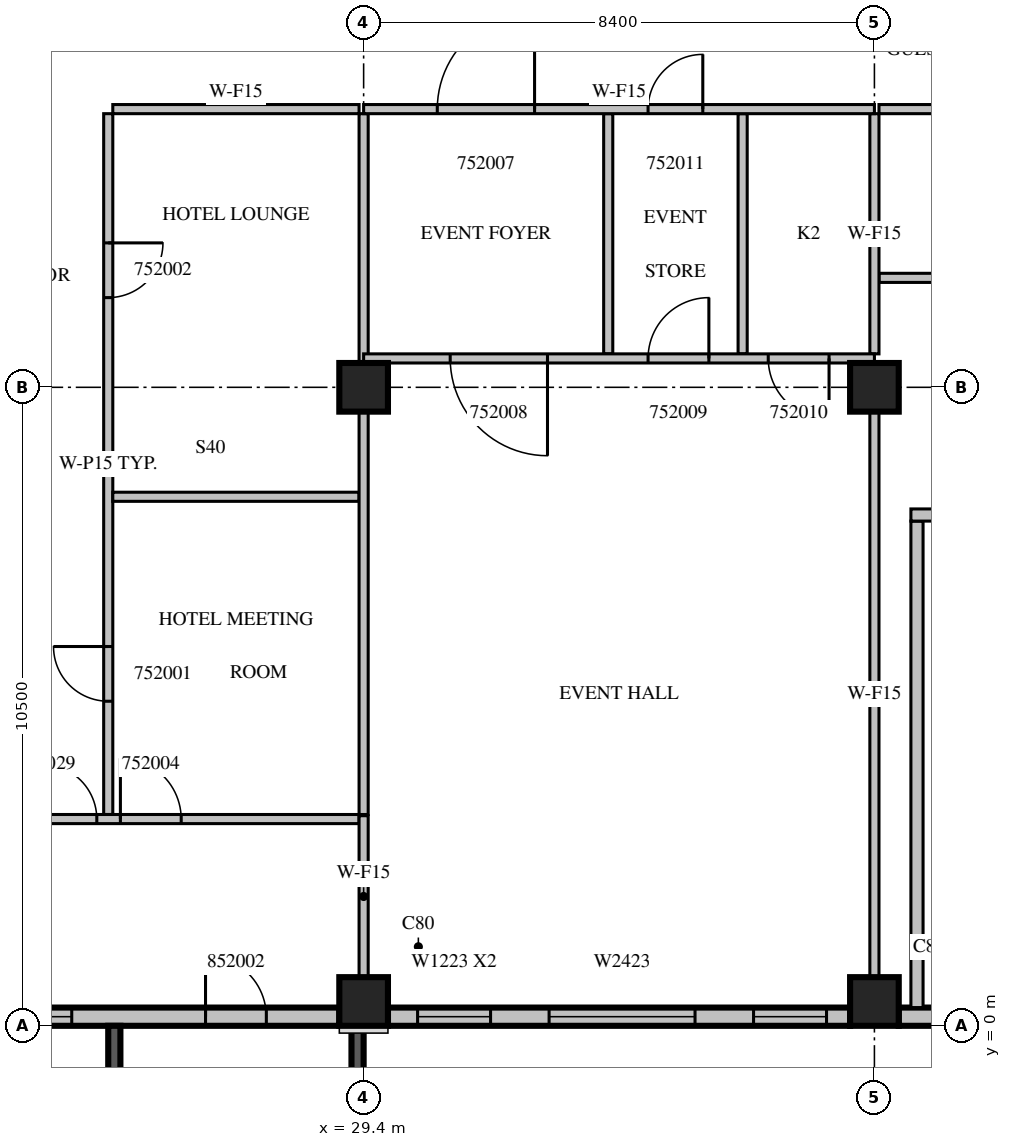
"""IFC4 building model, lengths in metres.
Left out: names, types, materials, properties, quantities, classifications, styles, units other than length and angle.
Written with IfcOpenShell. Run it as: python <this file> out.ifc"""

import sys

from ifc_helpers import new_model, si_unit, direction, frame, frame_2d, origin, origin_2d, place, context, subcontext, project, spatial, rectangle, extrude, source, transform, mapped, element, fill, save


model = new_model("IFC4")
c1 = context("Model", 3, precision=1e-05, world=origin(), true_north=direction((0.0, 1.0)))
c2 = subcontext(c1, "Body", "Model", "MODEL_VIEW")
j1 = project(units=[si_unit("LENGTHUNIT", "METRE"), si_unit("PLANEANGLEUNIT", "RADIAN")], contexts=[c1])
p1 = place(None, origin())
s1 = spatial("IfcSite", under=j1, at=p1, CompositionType="ELEMENT")
p2 = place(p1, origin())
s2 = spatial("IfcBuilding", under=s1, at=p2, CompositionType="ELEMENT")
p3 = place(p2, frame((0.0, 0.0, 231.0)))
s3 = spatial("IfcBuildingStorey", under=s2, at=p3, CompositionType="ELEMENT", Elevation=231.0)
m1 = source(origin(), c2, "Body", "SweptSolid", [
    extrude(rectangle(XDim=0.8, YDim=0.8, at=origin_2d()), origin(), (0.0, 0.0, 1.0), 3.8),
])
for number, where, z_axis, x_axis in (
    (1, (29.4, 0.4, 0.0), (0.0, 0.0, 1.0), (1.0, 0.0, 0.0)),
    (2, (37.8, 0.4, 0.0), (0.0, 0.0, 1.0), (1.0, 0.0, 0.0)),
    (3, (29.4, 10.5, 0.0), (0.0, 0.0, 1.0), (1.0, 0.0, 0.0)),
    (4, (37.8, 10.5, 0.0), (0.0, 0.0, 1.0), (1.0, 0.0, 0.0)),
):
    element("IfcColumn", number, at=place(p3, frame(where, z_axis=z_axis, x_axis=x_axis)), inside=s3, PredefinedType="COLUMN", context=c2, shape_type="MappedRepresentation", body=[
        mapped(m1, transform((0.0, 0.0, 0.0), scale=1.0)),
    ])
m2 = source(origin(), c2, "Body", "SweptSolid", [
    extrude(rectangle(XDim=7.6, YDim=0.3, at=frame_2d((3.8, 0.0))), origin(), (0.0, 0.0, 1.0), 3.4),
])
p4 = place(p3, frame((21.4, 0.15, 0.0), z_axis=(0.0, 0.0, 1.0), x_axis=(1.0, 0.0, 0.0)))
e5 = element("IfcWall", 5, at=p4, inside=s3, PredefinedType="STANDARD", context=c2, shape_type="MappedRepresentation", body=[
    mapped(m2, transform((0.0, 0.0, 0.0), scale=1.0)),
])
m3 = source(origin(), c2, "Body", "SweptSolid", [
    extrude(rectangle(XDim=3.0, YDim=2.3, at=frame_2d((1.5, 1.15))), frame((0.0, 0.16, 0.0), z_axis=(0.0, -1.0, 0.0), x_axis=(1.0, 0.0, 0.0)), (0.0, 0.0, 1.0), 0.32),
])
p5 = place(p4, frame((0.2, 0.0, 0.6)))
e6 = element("IfcOpeningElement", 6, at=p5, cuts=e5, PredefinedType="OPENING", context=c2, shape_type="MappedRepresentation", body=[
    mapped(m3, transform((0.0, 0.0, 0.0), scale=1.0)),
])
m4 = source(origin(), c2, "Body", "SweptSolid", [
    extrude(rectangle(XDim=1.0, YDim=2.1, at=frame_2d((0.5, 1.05))), frame((0.0, 0.16, 0.0), z_axis=(0.0, -1.0, 0.0), x_axis=(1.0, 0.0, 0.0)), (0.0, 0.0, 1.0), 0.32),
])
p6 = place(p4, frame((5.4, 0.0, 0.0)))
e7 = element("IfcOpeningElement", 7, at=p6, cuts=e5, PredefinedType="OPENING", context=c2, shape_type="MappedRepresentation", body=[
    mapped(m4, transform((0.0, 0.0, 0.0), scale=1.0)),
])
p7 = place(p3, frame((29.8, 0.15, 0.0), z_axis=(0.0, 0.0, 1.0), x_axis=(1.0, 0.0, 0.0)))
e8 = element("IfcWall", 8, at=p7, inside=s3, PredefinedType="STANDARD", context=c2, shape_type="MappedRepresentation", body=[
    mapped(m2, transform((0.0, 0.0, 0.0), scale=1.0)),
])
m5 = source(origin(), c2, "Body", "SweptSolid", [
    extrude(rectangle(XDim=1.2, YDim=2.3, at=frame_2d((0.6, 1.15))), frame((0.0, 0.16, 0.0), z_axis=(0.0, -1.0, 0.0), x_axis=(1.0, 0.0, 0.0)), (0.0, 0.0, 1.0), 0.32),
])
p8 = place(p7, frame((0.487, 0.0, 0.6)))
e9 = element("IfcOpeningElement", 9, at=p8, cuts=e8, PredefinedType="OPENING", context=c2, shape_type="MappedRepresentation", body=[
    mapped(m5, transform((0.0, 0.0, 0.0), scale=1.0)),
])
p9 = place(p7, frame((6.013, 0.0, 0.6)))
e10 = element("IfcOpeningElement", 10, at=p9, cuts=e8, PredefinedType="OPENING", context=c2, shape_type="MappedRepresentation", body=[
    mapped(m5, transform((0.0, 0.0, 0.0), scale=1.0)),
])
m6 = source(origin(), c2, "Body", "SweptSolid", [
    extrude(rectangle(XDim=2.4, YDim=2.3, at=frame_2d((1.2, 1.15))), frame((0.0, 0.16, 0.0), z_axis=(0.0, -1.0, 0.0), x_axis=(1.0, 0.0, 0.0)), (0.0, 0.0, 1.0), 0.32),
])
p10 = place(p7, frame((2.65, 0.0, 0.6)))
e11 = element("IfcOpeningElement", 11, at=p10, cuts=e8, PredefinedType="OPENING", context=c2, shape_type="MappedRepresentation", body=[
    mapped(m6, transform((0.0, 0.0, 0.0), scale=1.0)),
])
m7 = source(origin(), c2, "Body", "SweptSolid", [
    extrude(rectangle(XDim=2.0, YDim=0.3, at=frame_2d((1.0, 0.0))), origin(), (0.0, 0.0, 1.0), 3.4),
])
p11 = place(p3, frame((38.2, 0.15, 0.0), z_axis=(0.0, 0.0, 1.0), x_axis=(1.0, 0.0, 0.0)))
e12 = element("IfcWall", 12, at=p11, inside=s3, PredefinedType="STANDARD", context=c2, shape_type="MappedRepresentation", body=[
    mapped(m7, transform((0.0, 0.0, 0.0), scale=1.0)),
])
m8 = source(origin(), c2, "Body", "SweptSolid", [
    extrude(rectangle(XDim=3.9, YDim=0.2, at=frame_2d((1.95, 0.0))), origin(), (0.0, 0.0, 1.0), 3.39),
])
p12 = place(p3, frame((25.3, 0.0, 0.0), z_axis=(0.0, 0.0, 1.0), x_axis=(0.0, -1.0, 0.0)))
e13 = element("IfcWall", 13, at=p12, inside=s3, PredefinedType="SOLIDWALL", context=c2, shape_type="MappedRepresentation", body=[
    mapped(m8, transform((0.0, 0.0, 0.0), scale=1.0)),
])
m9 = source(origin(), c2, "Body", "SweptSolid", [
    extrude(rectangle(XDim=2.4, YDim=2.3, at=frame_2d((1.2, 1.15))), frame((0.0, 0.11, 0.0), z_axis=(0.0, -1.0, 0.0), x_axis=(1.0, 0.0, 0.0)), (0.0, 0.0, 1.0), 0.22),
])
p13 = place(p12, frame((0.75, 0.0, 0.6)))
e14 = element("IfcOpeningElement", 14, at=p13, cuts=e13, PredefinedType="OPENING", context=c2, shape_type="MappedRepresentation", body=[
    mapped(m9, transform((0.0, 0.0, 0.0), scale=1.0)),
])
p14 = place(p3, frame((29.3, 0.0, 0.0), z_axis=(0.0, 0.0, 1.0), x_axis=(0.0, -1.0, 0.0)))
e15 = element("IfcWall", 15, at=p14, inside=s3, PredefinedType="SOLIDWALL", context=c2, shape_type="MappedRepresentation", body=[
    mapped(m8, transform((0.0, 0.0, 0.0), scale=1.0)),
])
p15 = place(p14, frame((0.75, 0.0, 0.6)))
e16 = element("IfcOpeningElement", 16, at=p15, cuts=e15, PredefinedType="OPENING", context=c2, shape_type="MappedRepresentation", body=[
    mapped(m9, transform((0.0, 0.0, 0.0), scale=1.0)),
])
m10 = source(origin(), c2, "Body", "SweptSolid", [
    extrude(rectangle(XDim=8.0, YDim=0.2, at=frame_2d((4.0, 0.0))), origin(), (0.0, 0.0, 1.0), 3.4),
])
p16 = place(p3, frame((38.5, 0.3, 0.0), z_axis=(0.0, 0.0, 1.0), x_axis=(0.0, 1.0, 0.0)))
e17 = element("IfcWall", 17, at=p16, inside=s3, PredefinedType="PARTITIONING", context=c2, shape_type="MappedRepresentation", body=[
    mapped(m10, transform((0.0, 0.0, 0.0), scale=1.0)),
])
m11 = source(origin(), c2, "Body", "SweptSolid", [
    extrude(rectangle(XDim=5.45, YDim=0.2, at=frame_2d((2.725, 0.0))), origin(), (0.0, 0.0, 1.0), 3.4),
])
p17 = place(p3, frame((38.4, 8.4, 0.0), z_axis=(0.0, 0.0, 1.0), x_axis=(1.0, 0.0, 0.0)))
e18 = element("IfcWall", 18, at=p17, inside=s3, PredefinedType="PARTITIONING", context=c2, shape_type="MappedRepresentation", body=[
    mapped(m11, transform((0.0, 0.0, 0.0), scale=1.0)),
])
m12 = source(origin(), c2, "Body", "SweptSolid", [
    extrude(rectangle(XDim=1.2, YDim=2.1, at=frame_2d((0.6, 1.05))), frame((0.0, 0.11, 0.0), z_axis=(0.0, -1.0, 0.0), x_axis=(1.0, 0.0, 0.0)), (0.0, 0.0, 1.0), 0.22),
])
p18 = place(p17, frame((0.4, 0.0, 0.0)))
e19 = element("IfcOpeningElement", 19, at=p18, cuts=e18, PredefinedType="OPENING", context=c2, shape_type="MappedRepresentation", body=[
    mapped(m12, transform((0.0, 0.0, 0.0), scale=1.0)),
])
m13 = source(origin(), c2, "Body", "SweptSolid", [
    extrude(rectangle(XDim=0.9, YDim=2.1, at=frame_2d((0.45, 1.05))), frame((0.0, 0.11, 0.0), z_axis=(0.0, -1.0, 0.0), x_axis=(1.0, 0.0, 0.0)), (0.0, 0.0, 1.0), 0.22),
])
p19 = place(p17, frame((3.25, 0.0, 0.0)))
e20 = element("IfcOpeningElement", 20, at=p19, cuts=e18, PredefinedType="OPENING", context=c2, shape_type="MappedRepresentation", body=[
    mapped(m13, transform((0.0, 0.0, 0.0), scale=1.0)),
])
m14 = source(origin(), c2, "Body", "SweptSolid", [
    extrude(rectangle(XDim=11.525, YDim=0.15, at=frame_2d((5.763, 0.0))), origin(), (0.0, 0.0, 1.0), 3.4),
])
p20 = place(p3, frame((25.2, 15.0, 0.0), z_axis=(0.0, 0.0, 1.0), x_axis=(0.0, -1.0, 0.0)))
e21 = element("IfcWall", 21, at=p20, inside=s3, PredefinedType="PARTITIONING", context=c2, shape_type="MappedRepresentation", body=[
    mapped(m14, transform((0.0, 0.0, 0.0), scale=1.0)),
])
m15 = source(origin(), c2, "Body", "SweptSolid", [
    extrude(rectangle(XDim=0.9, YDim=2.1, at=frame_2d((0.45, 1.05))), frame((0.0, 0.085, 0.0), z_axis=(0.0, -1.0, 0.0), x_axis=(1.0, 0.0, 0.0)), (0.0, 0.0, 1.0), 0.17),
])
p21 = place(p20, frame((8.762, 0.0, 0.0)))
e22 = element("IfcOpeningElement", 22, at=p21, cuts=e21, PredefinedType="OPENING", context=c2, shape_type="MappedRepresentation", body=[
    mapped(m15, transform((0.0, 0.0, 0.0), scale=1.0)),
])
p22 = place(p20, frame((2.125, 0.0, 0.0)))
e23 = element("IfcOpeningElement", 23, at=p22, cuts=e21, PredefinedType="OPENING", context=c2, shape_type="MappedRepresentation", body=[
    mapped(m15, transform((0.0, 0.0, 0.0), scale=1.0)),
])
m16 = source(origin(), c2, "Body", "SweptSolid", [
    extrude(rectangle(XDim=4.05, YDim=0.15, at=frame_2d((2.025, 0.0))), origin(), (0.0, 0.0, 1.0), 3.4),
])
for number, where, z_axis, x_axis in (
    (24, (29.325, 8.7, 0.0), (0.0, 0.0, 1.0), (-1.0, 0.0, 0.0)),
    (25, (29.325, 15.075, 0.0), (0.0, 0.0, 1.0), (-1.0, 0.0, 0.0)),
):
    element("IfcWall", number, at=place(p3, frame(where, z_axis=z_axis, x_axis=x_axis)), inside=s3, PredefinedType="PARTITIONING", context=c2, shape_type="MappedRepresentation", body=[
        mapped(m16, transform((0.0, 0.0, 0.0), scale=1.0)),
    ])
m17 = source(origin(), c2, "Body", "SweptSolid", [
    extrude(rectangle(XDim=6.626, YDim=0.15, at=frame_2d((3.313, 0.0))), origin(), (0.0, 0.0, 1.0), 3.4),
])
p23 = place(p3, frame((29.4, 3.475, 0.0), z_axis=(0.0, 0.0, 1.0), x_axis=(0.0, 1.0, 0.0)))
e26 = element("IfcWall", 26, at=p23, inside=s3, PredefinedType="PARTITIONING", context=c2, shape_type="MappedRepresentation", body=[
    mapped(m17, transform((0.0, 0.0, 0.0), scale=1.0)),
])
m18 = source(origin(), c2, "Body", "SweptSolid", [
    extrude(rectangle(XDim=4.101, YDim=0.15, at=frame_2d((2.05, 0.0))), origin(), (0.0, 0.0, 1.0), 3.4),
])
p24 = place(p3, frame((29.4, 10.899, 0.0), z_axis=(0.0, 0.0, 1.0), x_axis=(0.0, 1.0, 0.0)))
e27 = element("IfcWall", 27, at=p24, inside=s3, PredefinedType="PARTITIONING", context=c2, shape_type="MappedRepresentation", body=[
    mapped(m18, transform((0.0, 0.0, 0.0), scale=1.0)),
])
m19 = source(origin(), c2, "Body", "SweptSolid", [
    extrude(rectangle(XDim=7.525, YDim=0.15, at=frame_2d((3.763, 0.0))), origin(), (0.0, 0.0, 1.0), 3.4),
])
p25 = place(p3, frame((21.8, 3.4, 0.0), z_axis=(0.0, 0.0, 1.0), x_axis=(1.0, 0.0, 0.0)))
e28 = element("IfcWall", 28, at=p25, inside=s3, PredefinedType="PARTITIONING", context=c2, shape_type="MappedRepresentation", body=[
    mapped(m19, transform((0.0, 0.0, 0.0), scale=1.0)),
])
m20 = source(origin(), c2, "Body", "SweptSolid", [
    extrude(rectangle(XDim=1.0, YDim=2.1, at=frame_2d((0.5, 1.05))), frame((0.0, 0.085, 0.0), z_axis=(0.0, -1.0, 0.0), x_axis=(1.0, 0.0, 0.0)), (0.0, 0.0, 1.0), 0.17),
])
p26 = place(p25, frame((3.6, 0.0, 0.0)))
e29 = element("IfcOpeningElement", 29, at=p26, cuts=e28, PredefinedType="OPENING", context=c2, shape_type="MappedRepresentation", body=[
    mapped(m20, transform((0.0, 0.0, 0.0), scale=1.0)),
])
p27 = place(p25, frame((2.312, 0.0, 0.0)))
e30 = element("IfcOpeningElement", 30, at=p27, cuts=e28, PredefinedType="OPENING", context=c2, shape_type="MappedRepresentation", body=[
    mapped(m15, transform((0.0, 0.0, 0.0), scale=1.0)),
])
m21 = source(origin(), c2, "Body", "SweptSolid", [
    extrude(rectangle(XDim=6.45, YDim=0.15, at=frame_2d((3.225, 0.0))), origin(), (0.0, 0.0, 1.0), 3.4),
])
p28 = place(p3, frame((37.875, 12.3, 0.0), z_axis=(0.0, 0.0, 1.0), x_axis=(1.0, 0.0, 0.0)))
e31 = element("IfcWall", 31, at=p28, inside=s3, PredefinedType="PARTITIONING", context=c2, shape_type="MappedRepresentation", body=[
    mapped(m21, transform((0.0, 0.0, 0.0), scale=1.0)),
])
p29 = place(p3, frame((44.325, 15.075, 0.0), z_axis=(0.0, 0.0, 1.0), x_axis=(-1.0, 0.0, 0.0)))
e32 = element("IfcWall", 32, at=p29, inside=s3, PredefinedType="PARTITIONING", context=c2, shape_type="MappedRepresentation", body=[
    mapped(m21, transform((0.0, 0.0, 0.0), scale=1.0)),
])
p30 = place(p29, frame((2.812, 0.0, 0.0)))
e33 = element("IfcOpeningElement", 33, at=p30, cuts=e32, PredefinedType="OPENING", context=c2, shape_type="MappedRepresentation", body=[
    mapped(m15, transform((0.0, 0.0, 0.0), scale=1.0)),
])
m22 = source(origin(), c2, "Body", "SweptSolid", [
    extrude(rectangle(XDim=3.95, YDim=0.15, at=frame_2d((1.975, 0.0))), origin(), (0.0, 0.0, 1.0), 3.4),
])
for number, where, z_axis, x_axis in (
    (34, (33.422, 11.05, 0.0), (0.0, 0.0, 1.0), (0.0, 1.0, 0.0)),
    (35, (35.633, 11.05, 0.0), (0.0, 0.0, 1.0), (0.0, 1.0, 0.0)),
):
    element("IfcWall", number, at=place(p3, frame(where, z_axis=z_axis, x_axis=x_axis)), inside=s3, PredefinedType="PARTITIONING", context=c2, shape_type="MappedRepresentation", body=[
        mapped(m22, transform((0.0, 0.0, 0.0), scale=1.0)),
    ])
m23 = source(origin(), c2, "Body", "SweptSolid", [
    extrude(rectangle(XDim=2.656, YDim=0.15, at=frame_2d((1.328, 0.0))), origin(), (0.0, 0.0, 1.0), 3.4),
])
p31 = place(p3, frame((29.4, 0.799, 0.0), z_axis=(0.0, 0.0, 1.0), x_axis=(0.0, 1.0, 0.0)))
e36 = element("IfcWall", 36, at=p31, inside=s3, PredefinedType="PARTITIONING", context=c2, shape_type="MappedRepresentation", body=[
    mapped(m23, transform((0.0, 0.0, 0.0), scale=1.0)),
])
m24 = source(origin(), c2, "Body", "SweptSolid", [
    extrude(rectangle(XDim=9.302, YDim=0.15, at=frame_2d((4.651, 0.0))), origin(), (0.0, 0.0, 1.0), 3.4),
])
p32 = place(p3, frame((37.8, 0.799, 0.0), z_axis=(0.0, 0.0, 1.0), x_axis=(0.0, 1.0, 0.0)))
e37 = element("IfcWall", 37, at=p32, inside=s3, PredefinedType="PARTITIONING", context=c2, shape_type="MappedRepresentation", body=[
    mapped(m24, transform((0.0, 0.0, 0.0), scale=1.0)),
])
p33 = place(p3, frame((37.8, 11.05, 0.0), z_axis=(0.0, 0.0, 1.0), x_axis=(0.0, 1.0, 0.0)))
e38 = element("IfcWall", 38, at=p33, inside=s3, PredefinedType="PARTITIONING", context=c2, shape_type="MappedRepresentation", body=[
    mapped(m22, transform((0.0, 0.0, 0.0), scale=1.0)),
])
m25 = source(origin(), c2, "Body", "SweptSolid", [
    extrude(rectangle(XDim=8.4, YDim=0.15, at=frame_2d((4.2, 0.0))), origin(), (0.0, 0.0, 1.0), 3.4),
])
p34 = place(p3, frame((37.8, 10.975, 0.0), z_axis=(0.0, 0.0, 1.0), x_axis=(-1.0, 0.0, 0.0)))
e39 = element("IfcWall", 39, at=p34, inside=s3, PredefinedType="PARTITIONING", context=c2, shape_type="MappedRepresentation", body=[
    mapped(m25, transform((0.0, 0.0, 0.0), scale=1.0)),
])
m26 = source(origin(), c2, "Body", "SweptSolid", [
    extrude(rectangle(XDim=1.6, YDim=2.1, at=frame_2d((0.8, 1.05))), frame((0.0, 0.085, 0.0), z_axis=(0.0, -1.0, 0.0), x_axis=(1.0, 0.0, 0.0)), (0.0, 0.0, 1.0), 0.17),
])
p35 = place(p34, frame((5.376, 0.0, 0.0)))
e40 = element("IfcOpeningElement", 40, at=p35, cuts=e39, PredefinedType="OPENING", context=c2, shape_type="MappedRepresentation", body=[
    mapped(m26, transform((0.0, 0.0, 0.0), scale=1.0)),
])
p36 = place(p34, frame((2.722, 0.0, 0.0)))
e41 = element("IfcOpeningElement", 41, at=p36, cuts=e39, PredefinedType="OPENING", context=c2, shape_type="MappedRepresentation", body=[
    mapped(m20, transform((0.0, 0.0, 0.0), scale=1.0)),
])
p37 = place(p34, frame((0.746, 0.0, 0.0)))
e42 = element("IfcOpeningElement", 42, at=p37, cuts=e39, PredefinedType="OPENING", context=c2, shape_type="MappedRepresentation", body=[
    mapped(m20, transform((0.0, 0.0, 0.0), scale=1.0)),
])
p38 = place(p3, frame((37.8, 15.075, 0.0), z_axis=(0.0, 0.0, 1.0), x_axis=(-1.0, 0.0, 0.0)))
e43 = element("IfcWall", 43, at=p38, inside=s3, PredefinedType="PARTITIONING", context=c2, shape_type="MappedRepresentation", body=[
    mapped(m25, transform((0.0, 0.0, 0.0), scale=1.0)),
])
p39 = place(p38, frame((5.589, 0.0, 0.0)))
e44 = element("IfcOpeningElement", 44, at=p39, cuts=e43, PredefinedType="OPENING", context=c2, shape_type="MappedRepresentation", body=[
    mapped(m26, transform((0.0, 0.0, 0.0), scale=1.0)),
])
p40 = place(p38, frame((2.822, 0.0, 0.0)))
e45 = element("IfcOpeningElement", 45, at=p40, cuts=e43, PredefinedType="OPENING", context=c2, shape_type="MappedRepresentation", body=[
    mapped(m15, transform((0.0, 0.0, 0.0), scale=1.0)),
])
m27 = source(origin(), c2, "Body", "SweptSolid", [
    extrude(rectangle(XDim=3.0, YDim=2.3, at=frame_2d((1.5, 1.15))), frame((0.0, 0.03, 0.0), z_axis=(0.0, -1.0, 0.0), x_axis=(1.0, 0.0, 0.0)), (0.0, 0.0, 1.0), 0.06),
])
p41 = place(p5, origin())
e46 = element("IfcWindow", 46, at=p41, inside=s3, PartitioningType="SINGLE_PANEL", PredefinedType="WINDOW", context=c2, shape_type="MappedRepresentation", body=[
    mapped(m27, transform((0.0, 0.0, 0.0), scale=1.0)),
])
fill(e6, e46)
m28 = source(origin(), c2, "Body", "SweptSolid", [
    extrude(rectangle(XDim=1.2, YDim=2.3, at=frame_2d((0.6, 1.15))), frame((0.0, 0.03, 0.0), z_axis=(0.0, -1.0, 0.0), x_axis=(1.0, 0.0, 0.0)), (0.0, 0.0, 1.0), 0.06),
])
p42 = place(p8, origin())
e47 = element("IfcWindow", 47, at=p42, inside=s3, PartitioningType="SINGLE_PANEL", PredefinedType="WINDOW", context=c2, shape_type="MappedRepresentation", body=[
    mapped(m28, transform((0.0, 0.0, 0.0), scale=1.0)),
])
fill(e9, e47)
p43 = place(p9, origin())
e48 = element("IfcWindow", 48, at=p43, inside=s3, PartitioningType="SINGLE_PANEL", PredefinedType="WINDOW", context=c2, shape_type="MappedRepresentation", body=[
    mapped(m28, transform((0.0, 0.0, 0.0), scale=1.0)),
])
fill(e10, e48)
m29 = source(origin(), c2, "Body", "SweptSolid", [
    extrude(rectangle(XDim=2.4, YDim=2.3, at=frame_2d((1.2, 1.15))), frame((0.0, 0.03, 0.0), z_axis=(0.0, -1.0, 0.0), x_axis=(1.0, 0.0, 0.0)), (0.0, 0.0, 1.0), 0.06),
])
p44 = place(p10, origin())
e49 = element("IfcWindow", 49, at=p44, inside=s3, PartitioningType="SINGLE_PANEL", PredefinedType="WINDOW", context=c2, shape_type="MappedRepresentation", body=[
    mapped(m29, transform((0.0, 0.0, 0.0), scale=1.0)),
])
fill(e11, e49)
m30 = source(origin(), c2, "Body", "SweptSolid", [
    extrude(rectangle(XDim=0.9, YDim=2.1, at=frame_2d((0.45, 1.05))), frame((0.0, 0.025, 0.0), z_axis=(0.0, -1.0, 0.0), x_axis=(1.0, 0.0, 0.0)), (0.0, 0.0, 1.0), 0.05),
])
p45 = place(p21, origin())
e50 = element("IfcDoor", 50, at=p45, inside=s3, OperationType="SINGLE_SWING_RIGHT", PredefinedType="DOOR", context=c2, shape_type="MappedRepresentation", body=[
    mapped(m30, transform((0.0, 0.0, 0.0), scale=1.0)),
])
fill(e22, e50)
p46 = place(p22, origin())
e51 = element("IfcDoor", 51, at=p46, inside=s3, OperationType="SINGLE_SWING_LEFT", PredefinedType="DOOR", context=c2, shape_type="MappedRepresentation", body=[
    mapped(m30, transform((0.0, 0.0, 0.0), scale=1.0)),
])
fill(e23, e51)
m31 = source(origin(), c2, "Body", "SweptSolid", [
    extrude(rectangle(XDim=1.0, YDim=2.1, at=frame_2d((0.5, 1.05))), frame((0.0, 0.025, 0.0), z_axis=(0.0, -1.0, 0.0), x_axis=(1.0, 0.0, 0.0)), (0.0, 0.0, 1.0), 0.05),
])
p47 = place(p26, origin())
e52 = element("IfcDoor", 52, at=p47, inside=s3, OperationType="SINGLE_SWING_LEFT", PredefinedType="DOOR", context=c2, shape_type="MappedRepresentation", body=[
    mapped(m31, transform((0.0, 0.0, 0.0), scale=1.0)),
])
fill(e29, e52)
m32 = source(origin(), c2, "Body", "SweptSolid", [
    extrude(rectangle(XDim=1.6, YDim=2.1, at=frame_2d((0.8, 1.05))), frame((0.0, 0.025, 0.0), z_axis=(0.0, -1.0, 0.0), x_axis=(1.0, 0.0, 0.0)), (0.0, 0.0, 1.0), 0.05),
])
p48 = place(p39, origin())
e53 = element("IfcDoor", 53, at=p48, inside=s3, OperationType="SINGLE_SWING_RIGHT", PredefinedType="DOOR", context=c2, shape_type="MappedRepresentation", body=[
    mapped(m32, transform((0.0, 0.0, 0.0), scale=1.0)),
])
fill(e44, e53)
p49 = place(p35, origin())
e54 = element("IfcDoor", 54, at=p49, inside=s3, OperationType="SINGLE_SWING_LEFT", PredefinedType="DOOR", context=c2, shape_type="MappedRepresentation", body=[
    mapped(m32, transform((0.0, 0.0, 0.0), scale=1.0)),
])
fill(e40, e54)
p50 = place(p36, origin())
e55 = element("IfcDoor", 55, at=p50, inside=s3, OperationType="SINGLE_SWING_RIGHT", PredefinedType="DOOR", context=c2, shape_type="MappedRepresentation", body=[
    mapped(m31, transform((0.0, 0.0, 0.0), scale=1.0)),
])
fill(e41, e55)
p51 = place(p37, origin())
e56 = element("IfcDoor", 56, at=p51, inside=s3, OperationType="SINGLE_SWING_LEFT", PredefinedType="DOOR", context=c2, shape_type="MappedRepresentation", body=[
    mapped(m31, transform((0.0, 0.0, 0.0), scale=1.0)),
])
fill(e42, e56)
p52 = place(p40, origin())
e57 = element("IfcDoor", 57, at=p52, inside=s3, OperationType="SINGLE_SWING_RIGHT", PredefinedType="DOOR", context=c2, shape_type="MappedRepresentation", body=[
    mapped(m30, transform((0.0, 0.0, 0.0), scale=1.0)),
])
fill(e45, e57)
p53 = place(p27, origin())
e58 = element("IfcDoor", 58, at=p53, inside=s3, OperationType="SINGLE_SWING_LEFT", PredefinedType="DOOR", context=c2, shape_type="MappedRepresentation", body=[
    mapped(m30, transform((0.0, 0.0, 0.0), scale=1.0)),
])
fill(e30, e58)
p54 = place(p6, origin())
e59 = element("IfcDoor", 59, at=p54, inside=s3, OperationType="SINGLE_SWING_LEFT", PredefinedType="DOOR", context=c2, shape_type="MappedRepresentation", body=[
    mapped(m31, transform((0.0, 0.0, 0.0), scale=1.0)),
])
fill(e7, e59)
save(model, sys.argv[1])
